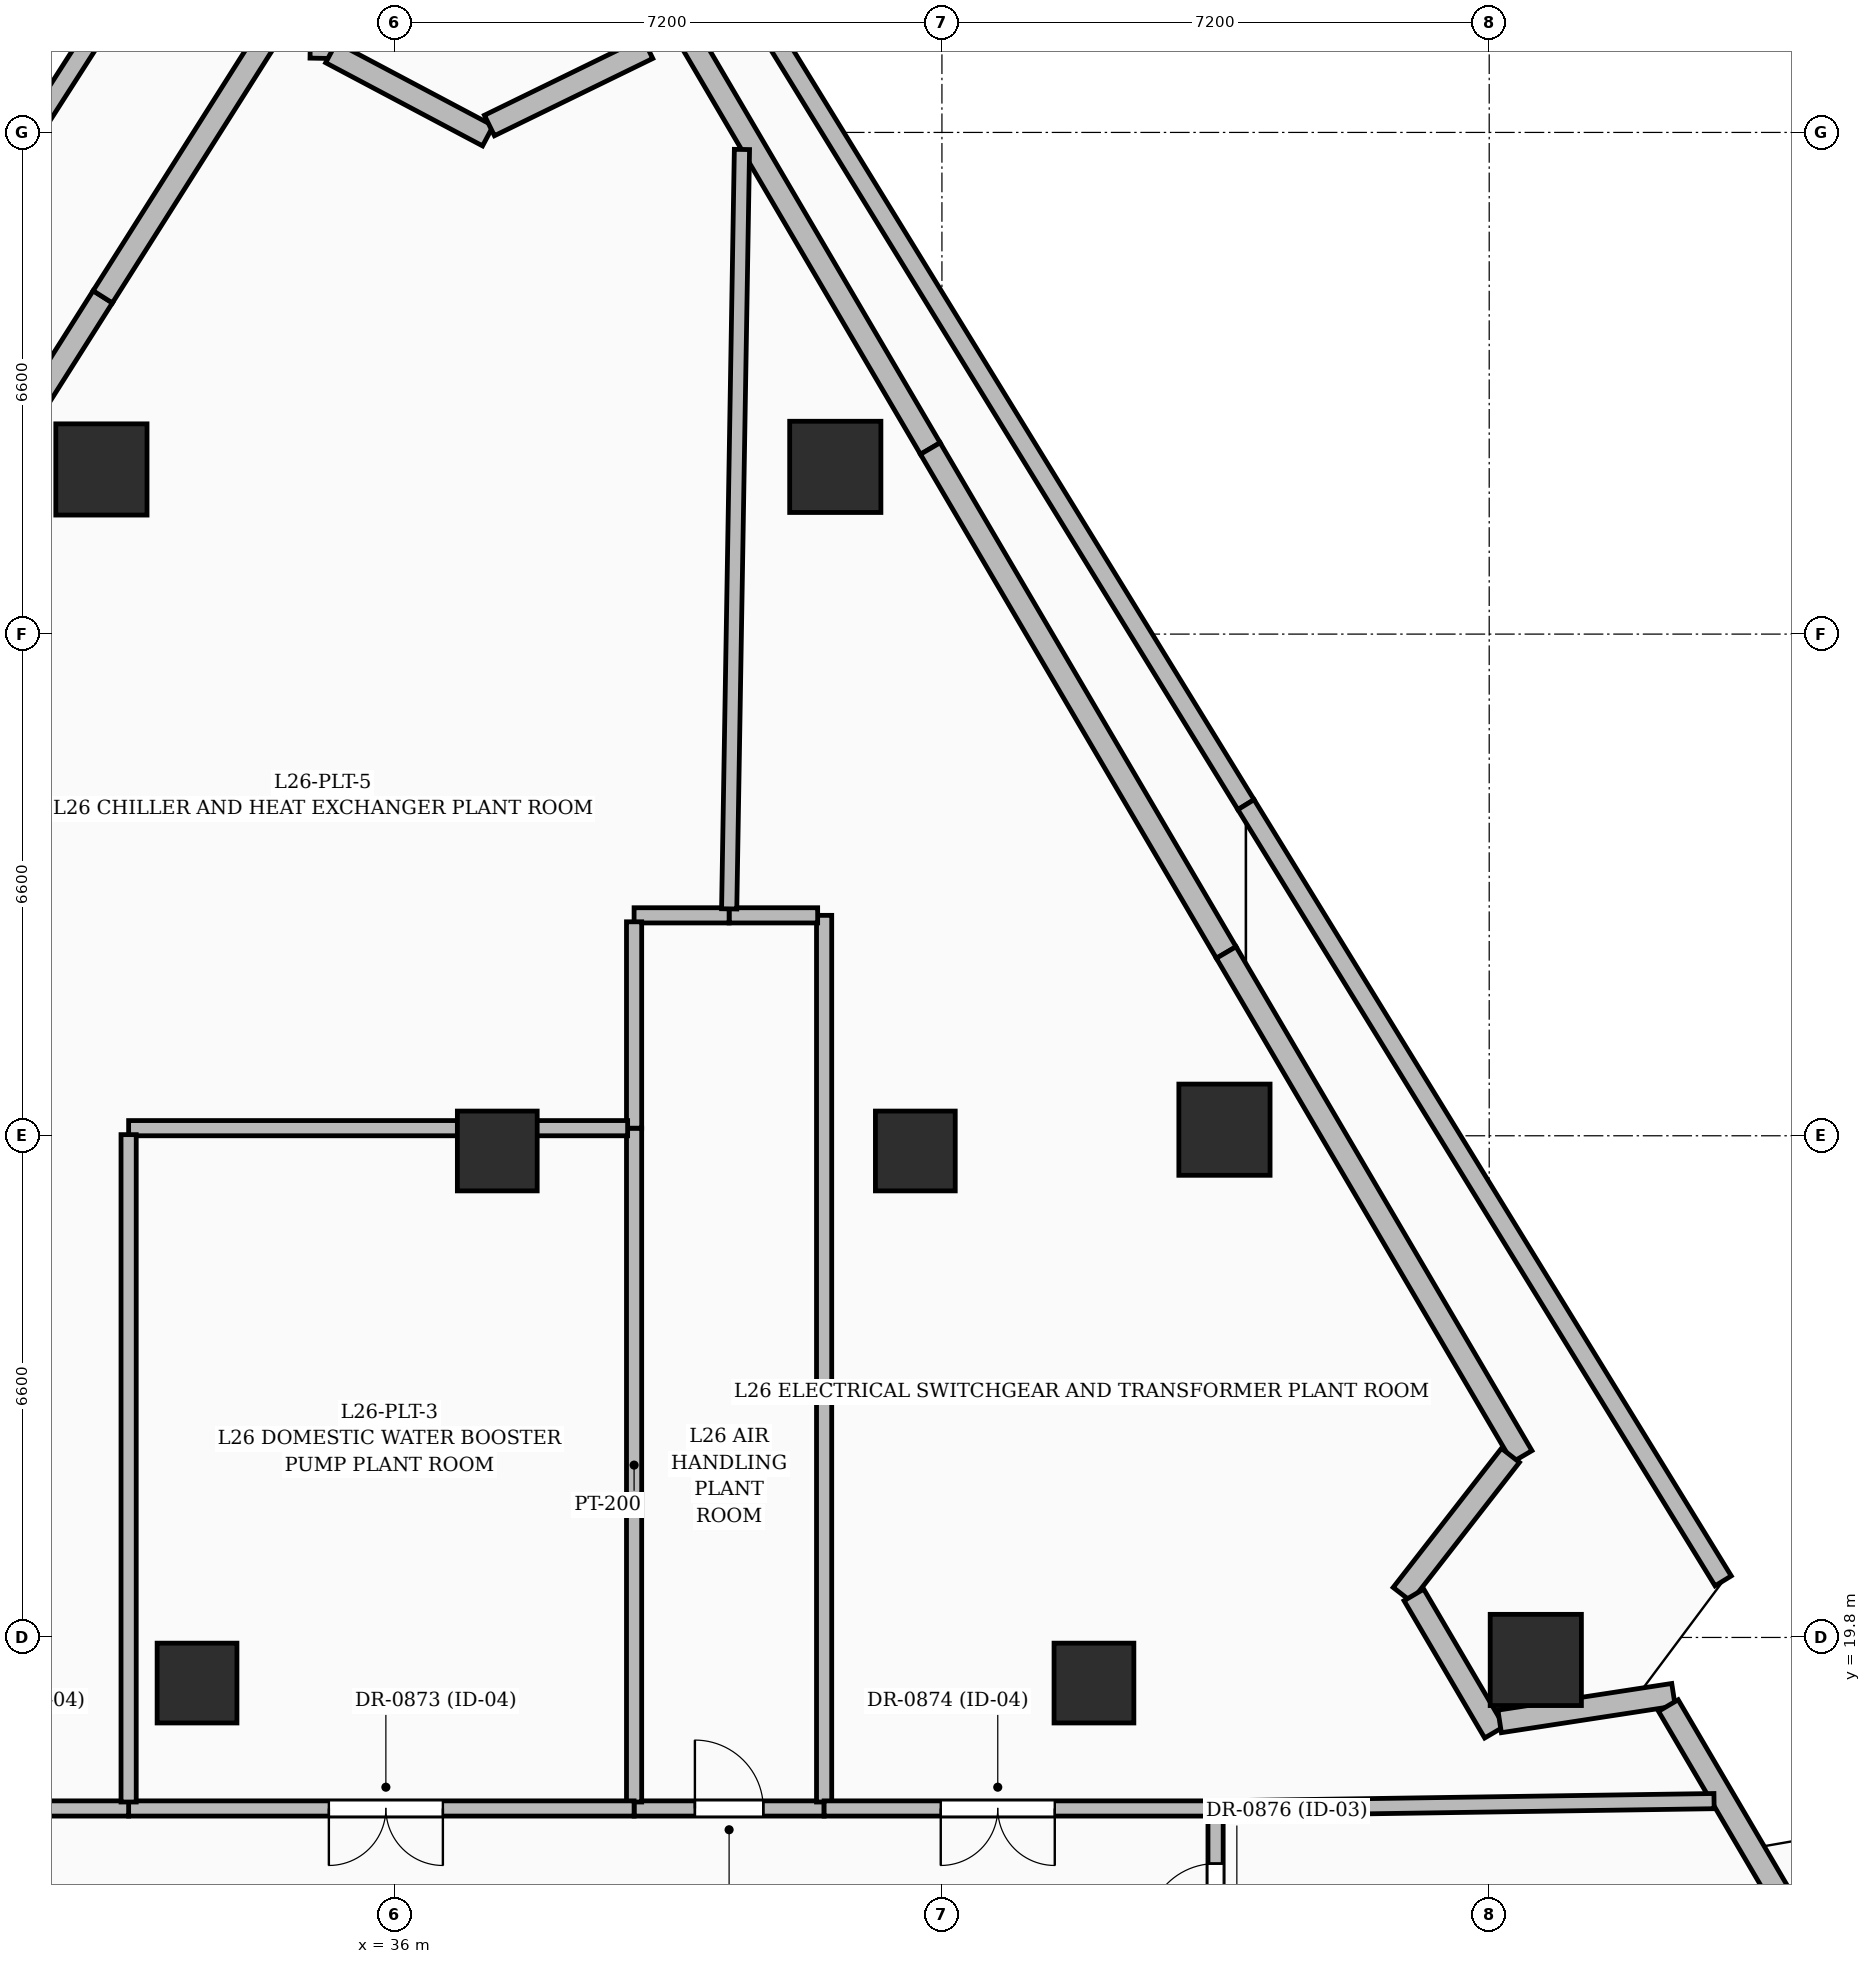
"""IFC4 building model, lengths in metres.
Left out: names, types, materials, properties, quantities, classifications, styles, units other than length and angle.
Written with IfcOpenShell. Run it as: python <this file> out.ifc"""

import sys

from ifc_helpers import new_model, si_unit, direction, frame, frame_2d, origin, origin_2d, place, context, subcontext, project, spatial, rectangle, extrude, element, fill, save


model = new_model("IFC4")
c1 = context("Model", 3, precision=1e-05, world=origin(), true_north=direction((0.0, 1.0)))
c2 = subcontext(c1, "Body", "Model", "MODEL_VIEW")
j1 = project(units=[si_unit("LENGTHUNIT", "METRE"), si_unit("PLANEANGLEUNIT", "RADIAN")], contexts=[c1])
p1 = place(None, origin())
s1 = spatial("IfcSite", under=j1, at=p1, CompositionType="ELEMENT")
p2 = place(p1, origin())
s2 = spatial("IfcBuilding", under=s1, at=p2, CompositionType="ELEMENT")
p3 = place(p2, frame((0.0, 0.0, 105.0)))
s3 = spatial("IfcBuildingStorey", under=s2, at=p3, CompositionType="ELEMENT", Elevation=105.0)
for number, where, z_axis, x_axis in (
    (1, (45.2, 19.2, 0.0), (0.0, 0.0, 1.0), (1.0, 0.0, 0.0)),
    (2, (42.85, 26.2, 0.0), (0.0, 0.0, 1.0), (1.0, 0.0, 0.0)),
    (3, (37.35, 26.2, 0.0), (0.0, 0.0, 1.0), (1.0, 0.0, 0.0)),
    (4, (33.4, 19.2, 0.0), (0.0, 0.0, 1.0), (1.0, 0.0, 0.0)),
):
    element("IfcColumn", number, at=place(p3, frame(where, z_axis=z_axis, x_axis=x_axis)), inside=s3, PredefinedType="COLUMN", context=c2, shape_type="SweptSolid", body=[
        extrude(rectangle(XDim=1.05, YDim=1.05, at=origin_2d()), origin(), (0.0, 0.0, 1.0), 5.4),
    ])
for number, where, z_axis, x_axis in (
    (5, (51.013, 19.504, 0.0), (0.0, 0.0, 1.0), (1.0, 0.0, 0.0)),
    (6, (46.917, 26.48, 0.0), (0.0, 0.0, 1.0), (1.0, 0.0, 0.0)),
    (7, (41.797, 35.2, 0.0), (0.0, 0.0, 1.0), (1.0, 0.0, 0.0)),
    (8, (32.142, 35.166, 0.0), (0.0, 0.0, 1.0), (1.0, 0.0, 0.0)),
):
    element("IfcColumn", number, at=place(p3, frame(where, z_axis=z_axis, x_axis=x_axis)), inside=s3, PredefinedType="COLUMN", context=c2, shape_type="SweptSolid", body=[
        extrude(rectangle(XDim=1.2, YDim=1.2, at=origin_2d()), origin(), (0.0, 0.0, 1.0), 5.4),
    ])
for number, where, z_axis, x_axis in (
    (9, (29.183, 32.736, 0.0), (0.0, 0.0, 1.0), (0.535, 0.845, 0.0)),
    (10, (32.16, 37.437, 0.0), (0.0, 0.0, 1.0), (0.535, 0.845, 0.0)),
):
    element("IfcWall", number, at=place(p3, frame(where, z_axis=z_axis, x_axis=x_axis)), inside=s3, PredefinedType="SOLIDWALL", context=c2, shape_type="SweptSolid", body=[
        extrude(rectangle(XDim=5.564, YDim=0.3, at=frame_2d((2.782, 0.0))), origin(), (0.0, 0.0, 1.0), 5.15),
    ])
p4 = place(p3, frame((35.054, 41.59, 0.0), z_axis=(0.0, 0.0, 1.0), x_axis=(-0.01683263167, -0.999858321219, 0.0)))
e11 = element("IfcWall", 11, at=p4, inside=s3, PredefinedType="SOLIDWALL", context=c2, shape_type="SweptSolid", body=[
    extrude(rectangle(XDim=1.015, YDim=0.3, at=frame_2d((0.508, 0.0))), origin(), (0.0, 0.0, 1.0), 5.15),
])
p5 = place(p3, frame((35.163, 40.649, 0.0), z_axis=(0.0, 0.0, 1.0), x_axis=(0.883579385988, -0.468281399008, 0.0)))
e12 = element("IfcWall", 12, at=p5, inside=s3, PredefinedType="SOLIDWALL", context=c2, shape_type="SweptSolid", body=[
    extrude(rectangle(XDim=2.336, YDim=0.3, at=frame_2d((1.168, 0.0))), origin(), (0.0, 0.0, 1.0), 5.15),
])
p6 = place(p3, frame((37.247, 39.691, 0.0), z_axis=(0.0, 0.0, 1.0), x_axis=(0.898724909847, 0.438512869162, 0.0)))
e13 = element("IfcWall", 13, at=p6, inside=s3, PredefinedType="SOLIDWALL", context=c2, shape_type="SweptSolid", body=[
    extrude(rectangle(XDim=2.318, YDim=0.3, at=frame_2d((1.159, 0.0))), origin(), (0.0, 0.0, 1.0), 5.15),
])
p7 = place(p3, frame((39.448, 41.572, 0.0), z_axis=(0.0, 0.0, 1.0), x_axis=(0.506346053327, -0.862330374207, 0.0)))
e14 = element("IfcWall", 14, at=p7, inside=s3, PredefinedType="SOLIDWALL", context=c2, shape_type="SweptSolid", body=[
    extrude(rectangle(XDim=7.108, YDim=0.3, at=frame_2d((3.554, 0.0))), origin(), (0.0, 0.0, 1.0), 5.15),
])
p8 = place(p3, frame((43.047, 35.442, 0.0), z_axis=(0.0, 0.0, 1.0), x_axis=(0.506305300475, -0.862354302309, 0.0)))
e15 = element("IfcWall", 15, at=p8, inside=s3, PredefinedType="SOLIDWALL", context=c2, shape_type="SweptSolid", body=[
    extrude(rectangle(XDim=7.689, YDim=0.3, at=frame_2d((3.844, 0.0))), origin(), (0.0, 0.0, 1.0), 5.15),
])
p9 = place(p3, frame((46.94, 28.811, 0.0), z_axis=(0.0, 0.0, 1.0), x_axis=(0.50635664286, -0.862324156122, 0.0)))
e16 = element("IfcWall", 16, at=p9, inside=s3, PredefinedType="SOLIDWALL", context=c2, shape_type="SweptSolid", body=[
    extrude(rectangle(XDim=7.688, YDim=0.3, at=frame_2d((3.844, 0.0))), origin(), (0.0, 0.0, 1.0), 5.15),
])
p10 = place(p3, frame((50.679, 22.196, 0.0), z_axis=(0.0, 0.0, 1.0), x_axis=(-0.61418839008, -0.789159439842, 0.0)))
e17 = element("IfcWall", 17, at=p10, inside=s3, PredefinedType="SOLIDWALL", context=c2, shape_type="SweptSolid", body=[
    extrude(rectangle(XDim=2.319, YDim=0.3, at=frame_2d((1.16, 0.0))), origin(), (0.0, 0.0, 1.0), 4.375),
])
p11 = place(p3, frame((49.409, 20.36, 0.0), z_axis=(0.0, 0.0, 1.0), x_axis=(0.506383340868, -0.862308478499, 0.0)))
e18 = element("IfcWall", 18, at=p11, inside=s3, PredefinedType="SOLIDWALL", context=c2, shape_type="SweptSolid", body=[
    extrude(rectangle(XDim=2.095, YDim=0.3, at=frame_2d((1.047, 0.0))), origin(), (0.0, 0.0, 1.0), 4.177),
])
p12 = place(p3, frame((50.537, 18.695, 0.0), z_axis=(0.0, 0.0, 1.0), x_axis=(0.98843869016, 0.151621092844, 0.0)))
e19 = element("IfcWall", 19, at=p12, inside=s3, PredefinedType="SOLIDWALL", context=c2, shape_type="SweptSolid", body=[
    extrude(rectangle(XDim=2.314, YDim=0.3, at=frame_2d((1.157, 0.0))), origin(), (0.0, 0.0, 1.0), 4.177),
])
p13 = place(p3, frame((52.757, 18.904, 0.0), z_axis=(0.0, 0.0, 1.0), x_axis=(0.506342912386, -0.862332218508, 0.0)))
e20 = element("IfcWall", 20, at=p13, inside=s3, PredefinedType="SOLIDWALL", context=c2, shape_type="SweptSolid", body=[
    extrude(rectangle(XDim=7.848, YDim=0.3, at=frame_2d((3.924, 0.0))), origin(), (0.0, 0.0, 1.0), 5.15),
])
p14 = place(p3, frame((27.5, 33.797, 0.0), z_axis=(0.0, 0.0, 1.0), x_axis=(0.539485865743, 0.841994655959, 0.0)))
e21 = element("IfcWall", 21, at=p14, inside=s3, PredefinedType="PARAPET", context=c2, shape_type="SweptSolid", body=[
    extrude(rectangle(XDim=11.668, YDim=0.25, at=frame_2d((5.834, 0.0))), origin(), (0.0, 0.0, 1.0), 1.15),
])
p15 = place(p3, frame((39.323, 43.57, 0.0), z_axis=(0.0, 0.0, 1.0), x_axis=(0.523691649494, -0.851907891882, 0.0)))
e22 = element("IfcWall", 22, at=p15, inside=s3, PredefinedType="PARAPET", context=c2, shape_type="SweptSolid", body=[
    extrude(rectangle(XDim=15.041, YDim=0.25, at=frame_2d((7.521, 0.0))), origin(), (0.0, 0.0, 1.0), 1.15),
])
p16 = place(p3, frame((47.2, 30.756, 0.0), z_axis=(0.0, 0.0, 1.0), x_axis=(0.523705351239, -0.851899468883, 0.0)))
e23 = element("IfcWall", 23, at=p16, inside=s3, PredefinedType="PARAPET", context=c2, shape_type="SweptSolid", body=[
    extrude(rectangle(XDim=11.988, YDim=0.25, at=frame_2d((5.994, 0.0))), origin(), (0.0, 0.0, 1.0), 1.15),
])
p17 = place(p3, frame((39.15, 17.55, 0.0), z_axis=(0.0, 0.0, 1.0), x_axis=(1.0, 0.0, 0.0)))
e24 = element("IfcWall", 24, at=p17, inside=s3, PredefinedType="PARTITIONING", context=c2, shape_type="SweptSolid", body=[
    extrude(rectangle(XDim=2.5, YDim=0.2, at=frame_2d((1.25, 0.0))), origin(), (0.0, 0.0, 1.0), 5.15),
])
p18 = place(p17, frame((0.8, 0.0, 0.0)))
e25 = element("IfcOpeningElement", 25, at=p18, cuts=e24, PredefinedType="OPENING", context=c2, shape_type="SweptSolid", body=[
    extrude(rectangle(XDim=0.9, YDim=2.1, at=frame_2d((0.45, 1.05))), frame((0.0, 0.11, 0.0), z_axis=(0.0, -1.0, 0.0), x_axis=(1.0, 0.0, 0.0)), (0.0, 0.0, 1.0), 0.22),
])
p19 = place(p3, frame((39.15, 26.5, 0.0), z_axis=(0.0, 0.0, 1.0), x_axis=(0.0, -1.0, 0.0)))
e26 = element("IfcWall", 26, at=p19, inside=s3, PredefinedType="PARTITIONING", context=c2, shape_type="SweptSolid", body=[
    extrude(rectangle(XDim=8.865, YDim=0.2, at=frame_2d((4.433, 0.0))), origin(), (0.0, 0.0, 1.0), 4.17),
])
p20 = place(p3, frame((41.65, 17.635, 0.0), z_axis=(0.0, 0.0, 1.0), x_axis=(0.0, 1.0, 0.0)))
e27 = element("IfcWall", 27, at=p20, inside=s3, PredefinedType="PARTITIONING", context=c2, shape_type="SweptSolid", body=[
    extrude(rectangle(XDim=11.665, YDim=0.2, at=frame_2d((5.833, 0.0))), origin(), (0.0, 0.0, 1.0), 4.17),
])
p21 = place(p3, frame((41.565, 29.3, 0.0), z_axis=(0.0, 0.0, 1.0), x_axis=(-1.0, 0.0, 0.0)))
e28 = element("IfcWall", 28, at=p21, inside=s3, PredefinedType="PARTITIONING", context=c2, shape_type="SweptSolid", body=[
    extrude(rectangle(XDim=1.165, YDim=0.2, at=frame_2d((0.583, 0.0))), origin(), (0.0, 0.0, 1.0), 5.15),
])
p22 = place(p3, frame((40.4, 29.3, 0.0), z_axis=(0.0, 0.0, 1.0), x_axis=(-1.0, 0.0, 0.0)))
e29 = element("IfcWall", 29, at=p22, inside=s3, PredefinedType="PARTITIONING", context=c2, shape_type="SweptSolid", body=[
    extrude(rectangle(XDim=1.25, YDim=0.2, at=frame_2d((0.625, 0.0))), origin(), (0.0, 0.0, 1.0), 5.15),
])
p23 = place(p3, frame((39.15, 29.215, 0.0), z_axis=(0.0, 0.0, 1.0), x_axis=(0.0, -1.0, 0.0)))
e30 = element("IfcWall", 30, at=p23, inside=s3, PredefinedType="PARTITIONING", context=c2, shape_type="SweptSolid", body=[
    extrude(rectangle(XDim=2.715, YDim=0.2, at=frame_2d((1.357, 0.0))), origin(), (0.0, 0.0, 1.0), 5.15),
])
p24 = place(p3, frame((39.15, 17.55, 0.0), z_axis=(0.0, 0.0, 1.0), x_axis=(-1.0, 0.0, 0.0)))
e31 = element("IfcWall", 31, at=p24, inside=s3, PredefinedType="PARTITIONING", context=c2, shape_type="SweptSolid", body=[
    extrude(rectangle(XDim=6.65, YDim=0.2, at=frame_2d((3.325, 0.0))), origin(), (0.0, 0.0, 1.0), 4.236),
])
p25 = place(p24, frame((2.516, 0.0, 0.0)))
e32 = element("IfcOpeningElement", 32, at=p25, cuts=e31, PredefinedType="OPENING", context=c2, shape_type="SweptSolid", body=[
    extrude(rectangle(XDim=1.5, YDim=2.2, at=frame_2d((0.75, 1.1))), frame((0.0, 0.11, 0.0), z_axis=(0.0, -1.0, 0.0), x_axis=(1.0, 0.0, 0.0)), (0.0, 0.0, 1.0), 0.22),
])
p26 = place(p3, frame((46.8, 17.55, 0.0), z_axis=(0.0, 0.0, 1.0), x_axis=(-1.0, 0.0, 0.0)))
e33 = element("IfcWall", 33, at=p26, inside=s3, PredefinedType="PARTITIONING", context=c2, shape_type="SweptSolid", body=[
    extrude(rectangle(XDim=5.15, YDim=0.2, at=frame_2d((2.575, 0.0))), origin(), (0.0, 0.0, 1.0), 4.236),
])
p27 = place(p26, frame((2.115, 0.0, 0.0)))
e34 = element("IfcOpeningElement", 34, at=p27, cuts=e33, PredefinedType="OPENING", context=c2, shape_type="SweptSolid", body=[
    extrude(rectangle(XDim=1.5, YDim=2.2, at=frame_2d((0.75, 1.1))), frame((0.0, 0.11, 0.0), z_axis=(0.0, -1.0, 0.0), x_axis=(1.0, 0.0, 0.0)), (0.0, 0.0, 1.0), 0.22),
])
p28 = place(p3, frame((46.8, 15.2, 0.0), z_axis=(0.0, 0.0, 1.0), x_axis=(0.0, 1.0, 0.0)))
e35 = element("IfcWall", 35, at=p28, inside=s3, PredefinedType="PARTITIONING", context=c2, shape_type="SweptSolid", body=[
    extrude(rectangle(XDim=2.265, YDim=0.2, at=frame_2d((1.133, 0.0))), origin(), (0.0, 0.0, 1.0), 4.236),
])
p29 = place(p28, frame((0.725, 0.0, 0.0)))
e36 = element("IfcOpeningElement", 36, at=p29, cuts=e35, PredefinedType="OPENING", context=c2, shape_type="SweptSolid", body=[
    extrude(rectangle(XDim=0.9, YDim=2.1, at=frame_2d((0.45, 1.05))), frame((0.0, 0.11, 0.0), z_axis=(0.0, -1.0, 0.0), x_axis=(1.0, 0.0, 0.0)), (0.0, 0.0, 1.0), 0.22),
])
p30 = place(p3, frame((32.5, 17.55, 0.0), z_axis=(0.0, 0.0, 1.0), x_axis=(-1.0, 0.0, 0.0)))
e37 = element("IfcWall", 37, at=p30, inside=s3, PredefinedType="PARTITIONING", context=c2, shape_type="SweptSolid", body=[
    extrude(rectangle(XDim=4.7, YDim=0.2, at=frame_2d((2.35, 0.0))), origin(), (0.0, 0.0, 1.0), 5.15),
])
p31 = place(p30, frame((1.542, 0.0, 0.0)))
e38 = element("IfcOpeningElement", 38, at=p31, cuts=e37, PredefinedType="OPENING", context=c2, shape_type="SweptSolid", body=[
    extrude(rectangle(XDim=1.5, YDim=2.2, at=frame_2d((0.75, 1.1))), frame((0.0, 0.11, 0.0), z_axis=(0.0, -1.0, 0.0), x_axis=(1.0, 0.0, 0.0)), (0.0, 0.0, 1.0), 0.22),
])
p32 = place(p3, frame((39.065, 26.5, 0.0), z_axis=(0.0, 0.0, 1.0), x_axis=(-1.0, 0.0, 0.0)))
e39 = element("IfcWall", 39, at=p32, inside=s3, PredefinedType="PARTITIONING", context=c2, shape_type="SweptSolid", body=[
    extrude(rectangle(XDim=6.565, YDim=0.2, at=frame_2d((3.282, 0.0))), origin(), (0.0, 0.0, 1.0), 4.033),
])
p33 = place(p3, frame((32.5, 26.415, 0.0), z_axis=(0.0, 0.0, 1.0), x_axis=(0.0, -1.0, 0.0)))
e40 = element("IfcWall", 40, at=p33, inside=s3, PredefinedType="PARTITIONING", context=c2, shape_type="SweptSolid", body=[
    extrude(rectangle(XDim=8.78, YDim=0.2, at=frame_2d((4.39, 0.0))), origin(), (0.0, 0.0, 1.0), 4.172),
])
p34 = place(p3, frame((46.8, 17.55, 0.0), z_axis=(0.0, 0.0, 1.0), x_axis=(0.999890796761, 0.014778178263, 0.0)))
e41 = element("IfcWall", 41, at=p34, inside=s3, PredefinedType="PARTITIONING", context=c2, shape_type="SweptSolid", body=[
    extrude(rectangle(XDim=6.559, YDim=0.2, at=frame_2d((3.279, 0.0))), origin(), (0.0, 0.0, 1.0), 4.172),
])
p35 = place(p3, frame((40.569, 39.376, 0.0), z_axis=(0.0, 0.0, 1.0), x_axis=(-0.016834112019, -0.999858296296, 0.0)))
e42 = element("IfcWall", 42, at=p35, inside=s3, PredefinedType="PARTITIONING", context=c2, shape_type="SweptSolid", body=[
    extrude(rectangle(XDim=9.992, YDim=0.2, at=frame_2d((4.996, 0.0))), origin(), (0.0, 0.0, 1.0), 4.37),
])
p36 = place(p18, origin())
e43 = element("IfcDoor", 43, at=p36, inside=s3, OperationType="SINGLE_SWING_LEFT", PredefinedType="DOOR", context=c2, shape_type="SweptSolid", body=[
    extrude(rectangle(XDim=0.9, YDim=2.1, at=frame_2d((0.45, 1.05))), frame((0.0, 0.025, 0.0), z_axis=(0.0, -1.0, 0.0), x_axis=(1.0, 0.0, 0.0)), (0.0, 0.0, 1.0), 0.05),
])
fill(e25, e43)
p37 = place(p25, origin())
e44 = element("IfcDoor", 44, at=p37, inside=s3, OperationType="DOUBLE_DOOR_SINGLE_SWING", PredefinedType="DOOR", context=c2, shape_type="SweptSolid", body=[
    extrude(rectangle(XDim=1.5, YDim=2.2, at=frame_2d((0.75, 1.1))), frame((0.0, 0.025, 0.0), z_axis=(0.0, -1.0, 0.0), x_axis=(1.0, 0.0, 0.0)), (0.0, 0.0, 1.0), 0.05),
])
fill(e32, e44)
p38 = place(p27, origin())
e45 = element("IfcDoor", 45, at=p38, inside=s3, OperationType="DOUBLE_DOOR_SINGLE_SWING", PredefinedType="DOOR", context=c2, shape_type="SweptSolid", body=[
    extrude(rectangle(XDim=1.5, YDim=2.2, at=frame_2d((0.75, 1.1))), frame((0.0, 0.025, 0.0), z_axis=(0.0, -1.0, 0.0), x_axis=(1.0, 0.0, 0.0)), (0.0, 0.0, 1.0), 0.05),
])
fill(e34, e45)
p39 = place(p29, origin())
e46 = element("IfcDoor", 46, at=p39, inside=s3, OperationType="SINGLE_SWING_LEFT", PredefinedType="DOOR", context=c2, shape_type="SweptSolid", body=[
    extrude(rectangle(XDim=0.9, YDim=2.1, at=frame_2d((0.45, 1.05))), frame((0.0, 0.025, 0.0), z_axis=(0.0, -1.0, 0.0), x_axis=(1.0, 0.0, 0.0)), (0.0, 0.0, 1.0), 0.05),
])
fill(e36, e46)
save(model, sys.argv[1])
